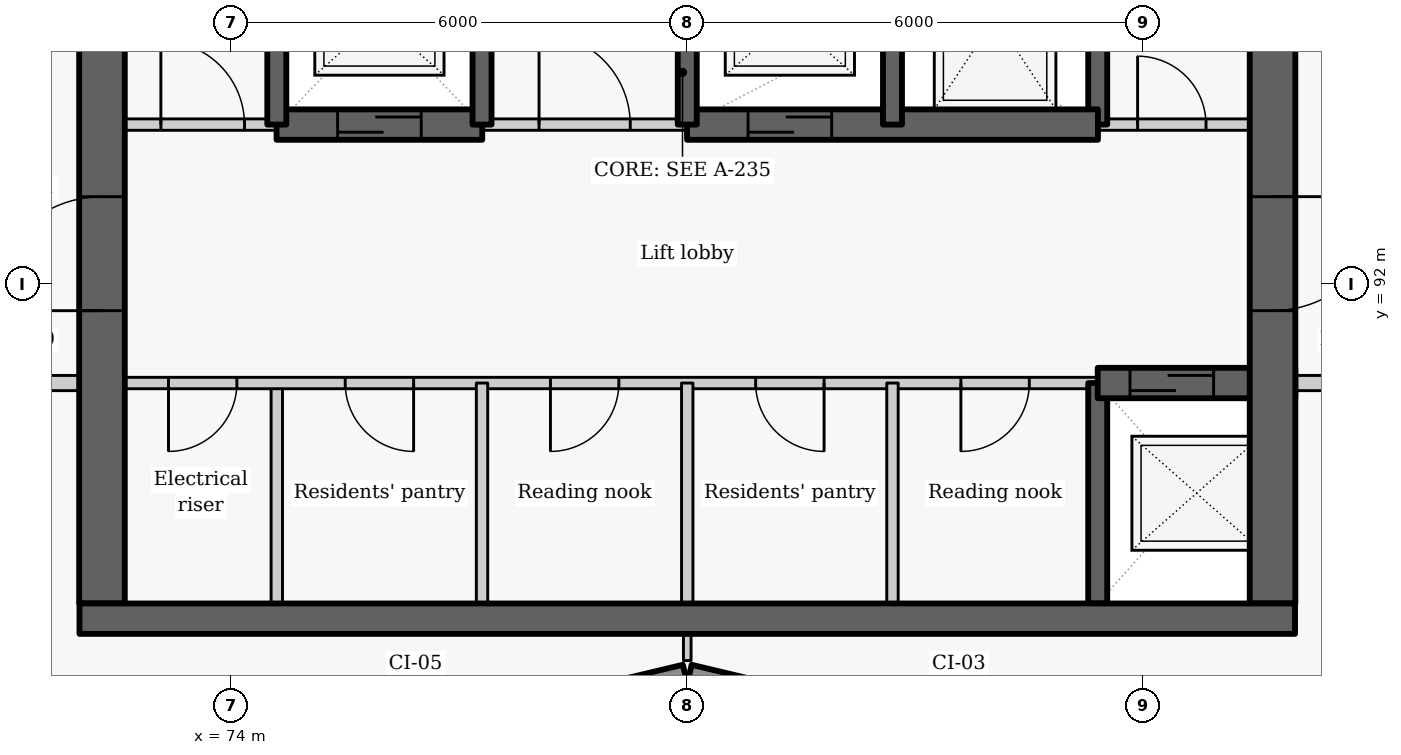
"""IFC4 building model, lengths in metres.
Left out: names, types, materials, properties, quantities, classifications, styles, units other than length and angle.
Written with IfcOpenShell. Run it as: python <this file> out.ifc"""

import sys

from ifc_helpers import new_model, si_unit, direction, frame, frame_2d, origin, place, context, subcontext, project, spatial, rectangle, extrude, element, fill, save


model = new_model("IFC4")
c1 = context("Model", 3, precision=1e-05, world=origin(), true_north=direction((0.0, 1.0)))
c2 = subcontext(c1, "Body", "Model", "MODEL_VIEW")
j1 = project(units=[si_unit("LENGTHUNIT", "METRE"), si_unit("PLANEANGLEUNIT", "RADIAN")], contexts=[c1])
p1 = place(None, origin())
s1 = spatial("IfcSite", under=j1, at=p1, CompositionType="ELEMENT")
p2 = place(p1, origin())
s2 = spatial("IfcBuilding", under=s1, at=p2, CompositionType="ELEMENT")
p3 = place(p2, frame((0.0, 0.0, 203.1)))
s3 = spatial("IfcBuildingStorey", under=s2, at=p3, CompositionType="ELEMENT", Elevation=203.1)
p4 = place(p3, frame((76.814, 86.119, 0.0), z_axis=(0.0, 0.0, 1.0), x_axis=(0.972773113459, 0.231759508395, 0.0)))
e1 = element("IfcWall", 1, at=p4, inside=s3, PredefinedType="SOLIDWALL", context=c2, shape_type="SweptSolid", body=[
    extrude(rectangle(XDim=3.246, YDim=0.25, at=frame_2d((1.623, 0.0))), origin(), (0.0, 0.0, 1.0), 2.425),
])
p5 = place(p4, frame((0.573, 0.0, 0.9)))
e2 = element("IfcOpeningElement", 2, at=p5, cuts=e1, PredefinedType="OPENING", context=c2, shape_type="SweptSolid", body=[
    extrude(rectangle(XDim=2.1, YDim=1.1, at=frame_2d((1.05, 0.55))), frame((0.0, 0.135, 0.0), z_axis=(0.0, -1.0, 0.0), x_axis=(1.0, 0.0, 0.0)), (0.0, 0.0, 1.0), 0.27),
])
p6 = place(p3, frame((80.029, 86.872, 0.0), z_axis=(0.0, 0.0, 1.0), x_axis=(0.972773113459, -0.231759508395, 0.0)))
e3 = element("IfcWall", 3, at=p6, inside=s3, PredefinedType="SOLIDWALL", context=c2, shape_type="SweptSolid", body=[
    extrude(rectangle(XDim=3.246, YDim=0.25, at=frame_2d((1.623, 0.0))), origin(), (0.0, 0.0, 1.0), 2.425),
])
p7 = place(p6, frame((0.573, 0.0, 0.9)))
e4 = element("IfcOpeningElement", 4, at=p7, cuts=e3, PredefinedType="OPENING", context=c2, shape_type="SweptSolid", body=[
    extrude(rectangle(XDim=2.1, YDim=1.1, at=frame_2d((1.05, 0.55))), frame((0.0, 0.135, 0.0), z_axis=(0.0, -1.0, 0.0), x_axis=(1.0, 0.0, 0.0)), (0.0, 0.0, 1.0), 0.27),
])
p8 = place(p3, frame((74.6, 87.8, 0.0), z_axis=(0.0, 0.0, 1.0), x_axis=(0.0, 1.0, 0.0)))
e5 = element("IfcWall", 5, at=p8, inside=s3, PredefinedType="PARTITIONING", context=c2, shape_type="SweptSolid", body=[
    extrude(rectangle(XDim=2.9, YDim=0.15, at=frame_2d((1.45, 0.0))), origin(), (0.0, 0.0, 1.0), 3.025),
])
p9 = place(p3, frame((85.4, 90.7, 0.0), z_axis=(0.0, 0.0, 1.0), x_axis=(-1.0, 0.0, 0.0)))
e6 = element("IfcWall", 6, at=p9, inside=s3, PredefinedType="PARTITIONING", context=c2, shape_type="SweptSolid", body=[
    extrude(rectangle(XDim=13.4, YDim=0.15, at=frame_2d((6.7, 0.0))), origin(), (0.0, 0.0, 1.0), 3.025),
])
p10 = place(p9, frame((11.325, 0.0, 0.0)))
e7 = element("IfcOpeningElement", 7, at=p10, cuts=e6, PredefinedType="OPENING", context=c2, shape_type="SweptSolid", body=[
    extrude(rectangle(XDim=0.9, YDim=2.1, at=frame_2d((0.45, 1.05))), frame((0.0, 0.085, 0.0), z_axis=(0.0, -1.0, 0.0), x_axis=(1.0, 0.0, 0.0)), (0.0, 0.0, 1.0), 0.17),
])
p11 = place(p9, frame((9.0, 0.0, 0.0)))
e8 = element("IfcOpeningElement", 8, at=p11, cuts=e6, PredefinedType="OPENING", context=c2, shape_type="SweptSolid", body=[
    extrude(rectangle(XDim=0.9, YDim=2.1, at=frame_2d((0.45, 1.05))), frame((0.0, 0.085, 0.0), z_axis=(0.0, -1.0, 0.0), x_axis=(1.0, 0.0, 0.0)), (0.0, 0.0, 1.0), 0.17),
])
p12 = place(p9, frame((6.3, 0.0, 0.0)))
e9 = element("IfcOpeningElement", 9, at=p12, cuts=e6, PredefinedType="OPENING", context=c2, shape_type="SweptSolid", body=[
    extrude(rectangle(XDim=0.9, YDim=2.1, at=frame_2d((0.45, 1.05))), frame((0.0, 0.085, 0.0), z_axis=(0.0, -1.0, 0.0), x_axis=(1.0, 0.0, 0.0)), (0.0, 0.0, 1.0), 0.17),
])
p13 = place(p9, frame((3.6, 0.0, 0.0)))
e10 = element("IfcOpeningElement", 10, at=p13, cuts=e6, PredefinedType="OPENING", context=c2, shape_type="SweptSolid", body=[
    extrude(rectangle(XDim=0.9, YDim=2.1, at=frame_2d((0.45, 1.05))), frame((0.0, 0.085, 0.0), z_axis=(0.0, -1.0, 0.0), x_axis=(1.0, 0.0, 0.0)), (0.0, 0.0, 1.0), 0.17),
])
p14 = place(p9, frame((0.9, 0.0, 0.0)))
e11 = element("IfcOpeningElement", 11, at=p14, cuts=e6, PredefinedType="OPENING", context=c2, shape_type="SweptSolid", body=[
    extrude(rectangle(XDim=0.9, YDim=2.1, at=frame_2d((0.45, 1.05))), frame((0.0, 0.085, 0.0), z_axis=(0.0, -1.0, 0.0), x_axis=(1.0, 0.0, 0.0)), (0.0, 0.0, 1.0), 0.17),
])
p15 = place(p3, frame((72.3, 87.8, -0.275), z_axis=(0.0, 0.0, 1.0), x_axis=(0.0, 1.0, 0.0)))
e12 = element("IfcWall", 12, at=p15, inside=s3, PredefinedType="SHEAR", context=c2, shape_type="SweptSolid", body=[
    extrude(rectangle(XDim=9.1, YDim=0.6, at=frame_2d((4.55, 0.0))), origin(), (0.0, 0.0, 1.0), 3.3),
])
p16 = place(p15, frame((3.852, 0.0, 0.275)))
e13 = element("IfcOpeningElement", 13, at=p16, cuts=e12, PredefinedType="OPENING", context=c2, shape_type="SweptSolid", body=[
    extrude(rectangle(XDim=1.5, YDim=2.1, at=frame_2d((0.75, 1.05))), frame((0.0, 0.31, 0.0), z_axis=(0.0, -1.0, 0.0), x_axis=(1.0, 0.0, 0.0)), (0.0, 0.0, 1.0), 0.62),
])
p17 = place(p3, frame((85.4, 87.8, -0.275), z_axis=(0.0, 0.0, 1.0), x_axis=(0.0, 1.0, 0.0)))
e14 = element("IfcWall", 14, at=p17, inside=s3, PredefinedType="SHEAR", context=c2, shape_type="SweptSolid", body=[
    extrude(rectangle(XDim=2.9, YDim=0.25, at=frame_2d((1.45, 0.0))), origin(), (0.0, 0.0, 1.0), 3.3),
])
p18 = place(p3, frame((85.4, 94.1, -0.275), z_axis=(0.0, 0.0, 1.0), x_axis=(0.0, 1.0, 0.0)))
e15 = element("IfcWall", 15, at=p18, inside=s3, PredefinedType="SHEAR", context=c2, shape_type="SweptSolid", body=[
    extrude(rectangle(XDim=2.8, YDim=0.25, at=frame_2d((1.4, 0.0))), origin(), (0.0, 0.0, 1.0), 3.3),
])
p19 = place(p3, frame((85.4, 90.7, -0.275), z_axis=(0.0, 0.0, 1.0), x_axis=(1.0, 0.0, 0.0)))
e16 = element("IfcWall", 16, at=p19, inside=s3, PredefinedType="SHEAR", context=c2, shape_type="SweptSolid", body=[
    extrude(rectangle(XDim=2.6, YDim=0.4, at=frame_2d((1.3, 0.0))), origin(), (0.0, 0.0, 1.0), 3.3),
])
p20 = place(p19, frame((0.425, 0.0, 0.275)))
e17 = element("IfcOpeningElement", 17, at=p20, cuts=e16, PredefinedType="OPENING", context=c2, shape_type="SweptSolid", body=[
    extrude(rectangle(XDim=1.1, YDim=2.1, at=frame_2d((0.55, 1.05))), frame((0.0, 0.21, 0.0), z_axis=(0.0, -1.0, 0.0), x_axis=(1.0, 0.0, 0.0)), (0.0, 0.0, 1.0), 0.42),
])
p21 = place(p3, frame((87.7, 102.05, -0.275), z_axis=(0.0, 0.0, 1.0), x_axis=(0.0, -1.0, 0.0)))
e18 = element("IfcWall", 18, at=p21, inside=s3, PredefinedType="SHEAR", context=c2, shape_type="SweptSolid", body=[
    extrude(rectangle(XDim=14.25, YDim=0.6, at=frame_2d((7.125, 0.0))), origin(), (0.0, 0.0, 1.0), 3.3),
])
p22 = place(p21, frame((8.898, 0.0, 0.275)))
e19 = element("IfcOpeningElement", 19, at=p22, cuts=e18, PredefinedType="OPENING", context=c2, shape_type="SweptSolid", body=[
    extrude(rectangle(XDim=1.5, YDim=2.1, at=frame_2d((0.75, 1.05))), frame((0.0, 0.31, 0.0), z_axis=(0.0, -1.0, 0.0), x_axis=(1.0, 0.0, 0.0)), (0.0, 0.0, 1.0), 0.62),
])
for number, where, z_axis, x_axis in (
    (20, (77.3, 87.8, 0.0), (0.0, 0.0, 1.0), (0.0, 1.0, 0.0)),
    (21, (80.0, 87.8, 0.0), (0.0, 0.0, 1.0), (0.0, 1.0, 0.0)),
    (22, (82.7, 87.8, 0.0), (0.0, 0.0, 1.0), (0.0, 1.0, 0.0)),
):
    element("IfcWall", number, at=place(p3, frame(where, z_axis=z_axis, x_axis=x_axis)), inside=s3, PredefinedType="PARTITIONING", context=c2, shape_type="SweptSolid", body=[
        extrude(rectangle(XDim=2.9, YDim=0.15, at=frame_2d((1.45, 0.0))), origin(), (0.0, 0.0, 1.0), 3.025),
    ])
p23 = place(p3, frame((72.0, 94.1, 0.0), z_axis=(0.0, 0.0, 1.0), x_axis=(1.0, 0.0, 0.0)))
e23 = element("IfcWall", 23, at=p23, inside=s3, PredefinedType="PARTITIONING", context=c2, shape_type="SweptSolid", body=[
    extrude(rectangle(XDim=2.603, YDim=0.15, at=frame_2d((1.302, 0.0))), origin(), (0.0, 0.0, 1.0), 3.025),
])
p24 = place(p23, frame((1.075, 0.0, 0.0)))
e24 = element("IfcOpeningElement", 24, at=p24, cuts=e23, PredefinedType="OPENING", context=c2, shape_type="SweptSolid", body=[
    extrude(rectangle(XDim=1.1, YDim=2.1, at=frame_2d((0.55, 1.05))), frame((0.0, 0.085, 0.0), z_axis=(0.0, -1.0, 0.0), x_axis=(1.0, 0.0, 0.0)), (0.0, 0.0, 1.0), 0.17),
])
p25 = place(p3, frame((77.297, 94.1, 0.0), z_axis=(0.0, 0.0, 1.0), x_axis=(1.0, 0.0, 0.0)))
e25 = element("IfcWall", 25, at=p25, inside=s3, PredefinedType="PARTITIONING", context=c2, shape_type="SweptSolid", body=[
    extrude(rectangle(XDim=2.706, YDim=0.15, at=frame_2d((1.353, 0.0))), origin(), (0.0, 0.0, 1.0), 3.025),
])
p26 = place(p25, frame((0.753, 0.0, 0.0)))
e26 = element("IfcOpeningElement", 26, at=p26, cuts=e25, PredefinedType="OPENING", context=c2, shape_type="SweptSolid", body=[
    extrude(rectangle(XDim=1.2, YDim=2.1, at=frame_2d((0.6, 1.05))), frame((0.0, 0.085, 0.0), z_axis=(0.0, -1.0, 0.0), x_axis=(1.0, 0.0, 0.0)), (0.0, 0.0, 1.0), 0.17),
])
p27 = place(p3, frame((85.397, 94.1, 0.0), z_axis=(0.0, 0.0, 1.0), x_axis=(1.0, 0.0, 0.0)))
e27 = element("IfcWall", 27, at=p27, inside=s3, PredefinedType="PARTITIONING", context=c2, shape_type="SweptSolid", body=[
    extrude(rectangle(XDim=2.603, YDim=0.15, at=frame_2d((1.302, 0.0))), origin(), (0.0, 0.0, 1.0), 3.025),
])
p28 = place(p27, frame((0.528, 0.0, 0.0)))
e28 = element("IfcOpeningElement", 28, at=p28, cuts=e27, PredefinedType="OPENING", context=c2, shape_type="SweptSolid", body=[
    extrude(rectangle(XDim=0.9, YDim=2.1, at=frame_2d((0.45, 1.05))), frame((0.0, 0.085, 0.0), z_axis=(0.0, -1.0, 0.0), x_axis=(1.0, 0.0, 0.0)), (0.0, 0.0, 1.0), 0.17),
])
p29 = place(p3, frame((74.597, 94.1, -0.275), z_axis=(0.0, 0.0, 1.0), x_axis=(1.0, 0.0, 0.0)))
e29 = element("IfcWall", 29, at=p29, inside=s3, PredefinedType="SHEAR", context=c2, shape_type="SweptSolid", body=[
    extrude(rectangle(XDim=2.706, YDim=0.4, at=frame_2d((1.353, 0.0))), origin(), (0.0, 0.0, 1.0), 3.3),
])
p30 = place(p29, frame((0.803, 0.0, 0.275)))
e30 = element("IfcOpeningElement", 30, at=p30, cuts=e29, PredefinedType="OPENING", context=c2, shape_type="SweptSolid", body=[
    extrude(rectangle(XDim=1.1, YDim=2.1, at=frame_2d((0.55, 1.05))), frame((0.0, 0.21, 0.0), z_axis=(0.0, -1.0, 0.0), x_axis=(1.0, 0.0, 0.0)), (0.0, 0.0, 1.0), 0.42),
])
p31 = place(p3, frame((79.997, 94.1, -0.275), z_axis=(0.0, 0.0, 1.0), x_axis=(1.0, 0.0, 0.0)))
e31 = element("IfcWall", 31, at=p31, inside=s3, PredefinedType="SHEAR", context=c2, shape_type="SweptSolid", body=[
    extrude(rectangle(XDim=5.406, YDim=0.4, at=frame_2d((2.703, 0.0))), origin(), (0.0, 0.0, 1.0), 3.3),
])
p32 = place(p31, frame((0.803, 0.0, 0.275)))
e32 = element("IfcOpeningElement", 32, at=p32, cuts=e31, PredefinedType="OPENING", context=c2, shape_type="SweptSolid", body=[
    extrude(rectangle(XDim=1.1, YDim=2.1, at=frame_2d((0.55, 1.05))), frame((0.0, 0.21, 0.0), z_axis=(0.0, -1.0, 0.0), x_axis=(1.0, 0.0, 0.0)), (0.0, 0.0, 1.0), 0.42),
])
for number, where, z_axis, x_axis in (
    (33, (74.6, 94.1, -0.275), (0.0, 0.0, 1.0), (0.0, 1.0, 0.0)),
    (34, (77.3, 94.1, -0.275), (0.0, 0.0, 1.0), (0.0, 1.0, 0.0)),
    (35, (80.0, 94.1, -0.275), (0.0, 0.0, 1.0), (0.0, 1.0, 0.0)),
    (36, (82.7, 94.1, -0.275), (0.0, 0.0, 1.0), (0.0, 1.0, 0.0)),
):
    element("IfcWall", number, at=place(p3, frame(where, z_axis=z_axis, x_axis=x_axis)), inside=s3, PredefinedType="SHEAR", context=c2, shape_type="SweptSolid", body=[
        extrude(rectangle(XDim=2.8, YDim=0.25, at=frame_2d((1.4, 0.0))), origin(), (0.0, 0.0, 1.0), 3.3),
    ])
for number, where, z_axis, x_axis in (
    (37, (70.45, 90.7, 0.0), (0.0, 0.0, 1.0), (1.0, 0.0, 0.0)),
    (38, (88.0, 90.7, 0.0), (0.0, 0.0, 1.0), (1.0, 0.0, 0.0)),
):
    element("IfcWall", number, at=place(p3, frame(where, z_axis=z_axis, x_axis=x_axis)), inside=s3, PredefinedType="PARTITIONING", context=c2, shape_type="SweptSolid", body=[
        extrude(rectangle(XDim=1.55, YDim=0.2, at=frame_2d((0.775, 0.0))), origin(), (0.0, 0.0, 1.0), 3.025),
    ])
p33 = place(p3, frame((80.0, 87.048, 0.0), z_axis=(0.0, 0.0, 1.0), x_axis=(0.0, 1.0, 0.0)))
e39 = element("IfcWall", 39, at=p33, inside=s3, PredefinedType="PARTITIONING", context=c2, shape_type="SweptSolid", body=[
    extrude(rectangle(XDim=0.352, YDim=0.1, at=frame_2d((0.176, 0.0))), origin(), (0.0, 0.0, 1.0), 3.025),
])
p34 = place(p3, frame((72.004, 87.6, -0.275), z_axis=(0.0, 0.0, 1.0), x_axis=(1.0, 0.0, 0.0)))
e40 = element("IfcWall", 40, at=p34, inside=s3, PredefinedType="SHEAR", context=c2, shape_type="SweptSolid", body=[
    extrude(rectangle(XDim=15.992, YDim=0.4, at=frame_2d((7.996, 0.0))), origin(), (0.0, 0.0, 1.0), 3.3),
])
p35 = place(p10, origin())
e41 = element("IfcDoor", 41, at=p35, inside=s3, OperationType="SINGLE_SWING_RIGHT", PredefinedType="DOOR", context=c2, shape_type="SweptSolid", body=[
    extrude(rectangle(XDim=0.9, YDim=2.1, at=frame_2d((0.45, 1.05))), frame((0.0, 0.025, 0.0), z_axis=(0.0, -1.0, 0.0), x_axis=(1.0, 0.0, 0.0)), (0.0, 0.0, 1.0), 0.05),
])
fill(e7, e41)
p36 = place(p20, origin())
e42 = element("IfcDoor", 42, at=p36, inside=s3, OperationType="SLIDING_TO_LEFT", PredefinedType="DOOR", context=c2, shape_type="SweptSolid", body=[
    extrude(rectangle(XDim=1.1, YDim=2.1, at=frame_2d((0.55, 1.05))), frame((0.0, 0.025, 0.0), z_axis=(0.0, -1.0, 0.0), x_axis=(1.0, 0.0, 0.0)), (0.0, 0.0, 1.0), 0.05),
])
fill(e17, e42)
p37 = place(p11, origin())
e43 = element("IfcDoor", 43, at=p37, inside=s3, OperationType="SINGLE_SWING_LEFT", PredefinedType="DOOR", context=c2, shape_type="SweptSolid", body=[
    extrude(rectangle(XDim=0.9, YDim=2.1, at=frame_2d((0.45, 1.05))), frame((0.0, 0.025, 0.0), z_axis=(0.0, -1.0, 0.0), x_axis=(1.0, 0.0, 0.0)), (0.0, 0.0, 1.0), 0.05),
])
fill(e8, e43)
p38 = place(p12, origin())
e44 = element("IfcDoor", 44, at=p38, inside=s3, OperationType="SINGLE_SWING_RIGHT", PredefinedType="DOOR", context=c2, shape_type="SweptSolid", body=[
    extrude(rectangle(XDim=0.9, YDim=2.1, at=frame_2d((0.45, 1.05))), frame((0.0, 0.025, 0.0), z_axis=(0.0, -1.0, 0.0), x_axis=(1.0, 0.0, 0.0)), (0.0, 0.0, 1.0), 0.05),
])
fill(e9, e44)
p39 = place(p13, origin())
e45 = element("IfcDoor", 45, at=p39, inside=s3, OperationType="SINGLE_SWING_LEFT", PredefinedType="DOOR", context=c2, shape_type="SweptSolid", body=[
    extrude(rectangle(XDim=0.9, YDim=2.1, at=frame_2d((0.45, 1.05))), frame((0.0, 0.025, 0.0), z_axis=(0.0, -1.0, 0.0), x_axis=(1.0, 0.0, 0.0)), (0.0, 0.0, 1.0), 0.05),
])
fill(e10, e45)
p40 = place(p14, origin())
e46 = element("IfcDoor", 46, at=p40, inside=s3, OperationType="SINGLE_SWING_RIGHT", PredefinedType="DOOR", context=c2, shape_type="SweptSolid", body=[
    extrude(rectangle(XDim=0.9, YDim=2.1, at=frame_2d((0.45, 1.05))), frame((0.0, 0.025, 0.0), z_axis=(0.0, -1.0, 0.0), x_axis=(1.0, 0.0, 0.0)), (0.0, 0.0, 1.0), 0.05),
])
fill(e11, e46)
p41 = place(p24, origin())
e47 = element("IfcDoor", 47, at=p41, inside=s3, OperationType="SINGLE_SWING_LEFT", PredefinedType="DOOR", context=c2, shape_type="SweptSolid", body=[
    extrude(rectangle(XDim=1.1, YDim=2.1, at=frame_2d((0.55, 1.05))), frame((0.0, 0.025, 0.0), z_axis=(0.0, -1.0, 0.0), x_axis=(1.0, 0.0, 0.0)), (0.0, 0.0, 1.0), 0.05),
])
fill(e24, e47)
p42 = place(p30, origin())
e48 = element("IfcDoor", 48, at=p42, inside=s3, OperationType="SLIDING_TO_LEFT", PredefinedType="DOOR", context=c2, shape_type="SweptSolid", body=[
    extrude(rectangle(XDim=1.1, YDim=2.1, at=frame_2d((0.55, 1.05))), frame((0.0, 0.025, 0.0), z_axis=(0.0, -1.0, 0.0), x_axis=(1.0, 0.0, 0.0)), (0.0, 0.0, 1.0), 0.05),
])
fill(e30, e48)
p43 = place(p26, origin())
e49 = element("IfcDoor", 49, at=p43, inside=s3, OperationType="DOUBLE_DOOR_SINGLE_SWING", PredefinedType="DOOR", context=c2, shape_type="SweptSolid", body=[
    extrude(rectangle(XDim=1.2, YDim=2.1, at=frame_2d((0.6, 1.05))), frame((0.0, 0.025, 0.0), z_axis=(0.0, -1.0, 0.0), x_axis=(1.0, 0.0, 0.0)), (0.0, 0.0, 1.0), 0.05),
])
fill(e26, e49)
p44 = place(p32, origin())
e50 = element("IfcDoor", 50, at=p44, inside=s3, OperationType="SLIDING_TO_LEFT", PredefinedType="DOOR", context=c2, shape_type="SweptSolid", body=[
    extrude(rectangle(XDim=1.1, YDim=2.1, at=frame_2d((0.55, 1.05))), frame((0.0, 0.025, 0.0), z_axis=(0.0, -1.0, 0.0), x_axis=(1.0, 0.0, 0.0)), (0.0, 0.0, 1.0), 0.05),
])
fill(e32, e50)
p45 = place(p28, origin())
e51 = element("IfcDoor", 51, at=p45, inside=s3, OperationType="SINGLE_SWING_LEFT", PredefinedType="DOOR", context=c2, shape_type="SweptSolid", body=[
    extrude(rectangle(XDim=0.9, YDim=2.1, at=frame_2d((0.45, 1.05))), frame((0.0, 0.025, 0.0), z_axis=(0.0, -1.0, 0.0), x_axis=(1.0, 0.0, 0.0)), (0.0, 0.0, 1.0), 0.05),
])
fill(e28, e51)
p46 = place(p22, origin())
e52 = element("IfcDoor", 52, at=p46, inside=s3, OperationType="DOUBLE_DOOR_SINGLE_SWING", PredefinedType="DOOR", context=c2, shape_type="SweptSolid", body=[
    extrude(rectangle(XDim=1.5, YDim=2.1, at=frame_2d((0.75, 1.05))), frame((0.0, 0.025, 0.0), z_axis=(0.0, -1.0, 0.0), x_axis=(1.0, 0.0, 0.0)), (0.0, 0.0, 1.0), 0.05),
])
fill(e19, e52)
p47 = place(p16, origin())
e53 = element("IfcDoor", 53, at=p47, inside=s3, OperationType="DOUBLE_DOOR_SINGLE_SWING", PredefinedType="DOOR", context=c2, shape_type="SweptSolid", body=[
    extrude(rectangle(XDim=1.5, YDim=2.1, at=frame_2d((0.75, 1.05))), frame((0.0, 0.025, 0.0), z_axis=(0.0, -1.0, 0.0), x_axis=(1.0, 0.0, 0.0)), (0.0, 0.0, 1.0), 0.05),
])
fill(e13, e53)
save(model, sys.argv[1])
